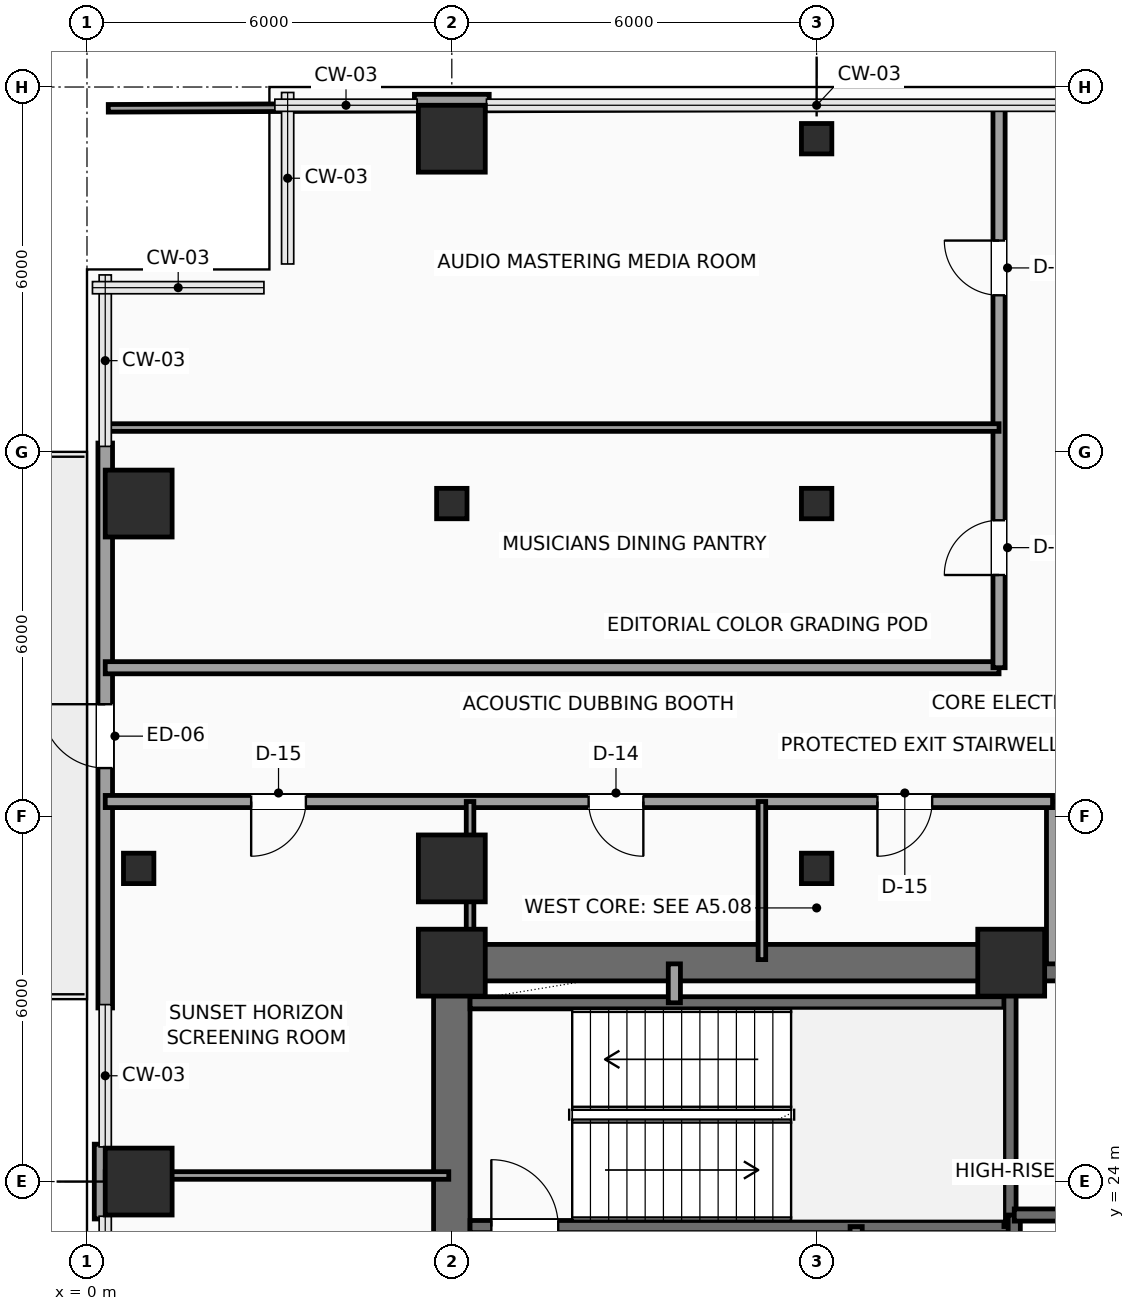
"""IFC4 building model, lengths in metres.
Left out: names, types, materials, properties, quantities, classifications, styles, units other than length and angle.
Written with IfcOpenShell. Run it as: python <this file> out.ifc"""

import sys

from ifc_helpers import new_model, si_unit, direction, frame, frame_2d, origin, origin_2d, place, context, subcontext, project, spatial, rectangle, hollow_rectangle, extrude, element, fill, save


model = new_model("IFC4")
c1 = context("Model", 3, precision=1e-05, world=origin(), true_north=direction((0.0, 1.0)))
c2 = subcontext(c1, "Body", "Model", "MODEL_VIEW")
j1 = project(units=[si_unit("LENGTHUNIT", "METRE"), si_unit("PLANEANGLEUNIT", "RADIAN")], contexts=[c1])
p1 = place(None, origin())
s1 = spatial("IfcSite", under=j1, at=p1, CompositionType="ELEMENT")
p2 = place(p1, origin())
s2 = spatial("IfcBuilding", under=s1, at=p2, CompositionType="ELEMENT")
p3 = place(p2, frame((0.0, 0.0, 153.15)))
s3 = spatial("IfcBuildingStorey", under=s2, at=p3, CompositionType="ELEMENT", Elevation=153.15)
for number, where, z_axis, x_axis in (
    (1, (6.0, 27.6, 0.0), (0.0, 0.0, 1.0), (1.0, 0.0, 0.0)),
    (2, (15.2, 27.6, 0.0), (0.0, 0.0, 1.0), (1.0, 0.0, 0.0)),
    (3, (0.85, 24.0, 0.0), (0.0, 0.0, 1.0), (1.0, 0.0, 0.0)),
):
    element("IfcColumn", number, at=place(p3, frame(where, z_axis=z_axis, x_axis=x_axis)), inside=s3, PredefinedType="COLUMN", context=c2, shape_type="SweptSolid", body=[
        extrude(rectangle(XDim=1.1, YDim=1.1, at=origin_2d()), origin(), (0.0, 0.0, 1.0), 3.75),
    ])
p4 = place(p3, frame((0.85, 29.15, 0.0), z_axis=(0.0, 0.0, 1.0), x_axis=(1.0, 0.0, 0.0)))
e4 = element("IfcColumn", 4, at=p4, inside=s3, PredefinedType="COLUMN", context=c2, shape_type="SweptSolid", body=[
    extrude(hollow_rectangle(XDim=0.5, YDim=0.5, WallThickness=0.025, InnerFilletRadius=0.025, OuterFilletRadius=0.04, at=origin_2d()), origin(), (0.0, 0.0, 1.0), 3.75),
])
for number, where, z_axis, x_axis in (
    (5, (0.85, 35.15, 0.0), (0.0, 0.0, 1.0), (1.0, 0.0, 0.0)),
    (6, (6.0, 29.15, 0.0), (0.0, 0.0, 1.0), (1.0, 0.0, 0.0)),
):
    element("IfcColumn", number, at=place(p3, frame(where, z_axis=z_axis, x_axis=x_axis)), inside=s3, PredefinedType="COLUMN", context=c2, shape_type="SweptSolid", body=[
        extrude(rectangle(XDim=1.1, YDim=1.1, at=origin_2d()), origin(), (0.0, 0.0, 1.0), 3.75),
    ])
p5 = place(p3, frame((6.0, 35.15, 0.0), z_axis=(0.0, 0.0, 1.0), x_axis=(1.0, 0.0, 0.0)))
e7 = element("IfcColumn", 7, at=p5, inside=s3, PredefinedType="COLUMN", context=c2, shape_type="SweptSolid", body=[
    extrude(hollow_rectangle(XDim=0.5, YDim=0.5, WallThickness=0.025, InnerFilletRadius=0.025, OuterFilletRadius=0.04, at=origin_2d()), origin(), (0.0, 0.0, 1.0), 3.75),
])
p6 = place(p3, frame((6.0, 41.15, 0.0), z_axis=(0.0, 0.0, 1.0), x_axis=(1.0, 0.0, 0.0)))
e8 = element("IfcColumn", 8, at=p6, inside=s3, PredefinedType="COLUMN", context=c2, shape_type="SweptSolid", body=[
    extrude(rectangle(XDim=1.1, YDim=1.1, at=origin_2d()), origin(), (0.0, 0.0, 1.0), 3.75),
])
for number, where, z_axis, x_axis in (
    (9, (12.0, 29.15, 0.0), (0.0, 0.0, 1.0), (1.0, 0.0, 0.0)),
    (10, (12.0, 35.15, 0.0), (0.0, 0.0, 1.0), (1.0, 0.0, 0.0)),
    (11, (12.0, 41.15, 0.0), (0.0, 0.0, 1.0), (1.0, 0.0, 0.0)),
):
    element("IfcColumn", number, at=place(p3, frame(where, z_axis=z_axis, x_axis=x_axis)), inside=s3, PredefinedType="COLUMN", context=c2, shape_type="SweptSolid", body=[
        extrude(hollow_rectangle(XDim=0.5, YDim=0.5, WallThickness=0.025, InnerFilletRadius=0.025, OuterFilletRadius=0.04, at=origin_2d()), origin(), (0.0, 0.0, 1.0), 3.75),
    ])
p7 = place(p3, frame((0.3, 26.855, 0.0), z_axis=(0.0, 0.0, 1.0), x_axis=(0.0, 1.0, 0.0)))
e12 = element("IfcWall", 12, at=p7, inside=s3, PredefinedType="SOLIDWALL", context=c2, shape_type="SweptSolid", body=[
    extrude(rectangle(XDim=9.29, YDim=0.24, at=frame_2d((4.645, 0.0))), origin(), (0.0, 0.0, 1.0), 3.525),
])
p8 = place(p7, frame((3.945, 0.0, 0.0)))
e13 = element("IfcOpeningElement", 13, at=p8, cuts=e12, PredefinedType="OPENING", context=c2, shape_type="SweptSolid", body=[
    extrude(rectangle(XDim=1.05, YDim=2.2, at=frame_2d((0.525, 1.1))), frame((0.0, 0.13, 0.0), z_axis=(0.0, -1.0, 0.0), x_axis=(1.0, 0.0, 0.0)), (0.0, 0.0, 1.0), 0.26),
])
for number, where, z_axis, x_axis in (
    (14, (0.24, 23.385, 0.0), (0.0, 0.0, 1.0), (0.0, 1.0, 0.0)),
    (15, (5.385, 41.76, 0.0), (0.0, 0.0, 1.0), (1.0, 0.0, 0.0)),
):
    element("IfcWall", number, at=place(p3, frame(where, z_axis=z_axis, x_axis=x_axis)), inside=s3, PredefinedType="SOLIDWALL", context=c2, shape_type="SweptSolid", body=[
        extrude(rectangle(XDim=1.23, YDim=0.24, at=frame_2d((0.615, 0.0))), origin(), (0.0, 0.0, 1.0), 3.525),
    ])
p9 = place(p3, frame((6.0, 27.6, 0.0), z_axis=(0.0, 0.0, 1.0), x_axis=(1.0, 0.0, 0.0)))
e16 = element("IfcWall", 16, at=p9, inside=s3, PredefinedType="SHEAR", context=c2, shape_type="SweptSolid", body=[
    extrude(rectangle(XDim=12.0, YDim=0.6, at=frame_2d((6.0, 0.0))), origin(), (0.0, 0.0, 1.0), 3.525),
])
p10 = place(p9, frame((10.2, 0.0, 0.0)))
e17 = element("IfcOpeningElement", 17, at=p10, cuts=e16, PredefinedType="OPENING", context=c2, shape_type="SweptSolid", body=[
    extrude(rectangle(XDim=0.9, YDim=2.15, at=frame_2d((0.45, 1.075))), frame((0.0, 0.31, 0.0), z_axis=(0.0, -1.0, 0.0), x_axis=(1.0, 0.0, 0.0)), (0.0, 0.0, 1.0), 0.62),
])
p11 = place(p3, frame((6.0, 18.0, 0.0), z_axis=(0.0, 0.0, 1.0), x_axis=(0.0, 1.0, 0.0)))
e18 = element("IfcWall", 18, at=p11, inside=s3, PredefinedType="SHEAR", context=c2, shape_type="SweptSolid", body=[
    extrude(rectangle(XDim=9.6, YDim=0.6, at=frame_2d((4.8, 0.0))), origin(), (0.0, 0.0, 1.0), 3.525),
])
p12 = place(p3, frame((6.3, 23.26, 0.0), z_axis=(0.0, 0.0, 1.0), x_axis=(1.0, 0.0, 0.0)))
e19 = element("IfcWall", 19, at=p12, inside=s3, PredefinedType="SHEAR", context=c2, shape_type="SweptSolid", body=[
    extrude(rectangle(XDim=8.88, YDim=0.2, at=frame_2d((4.44, 0.0))), origin(), (0.0, 0.0, 1.0), 3.525),
])
p13 = place(p12, frame((0.35, 0.0, 0.0)))
e20 = element("IfcOpeningElement", 20, at=p13, cuts=e19, PredefinedType="OPENING", context=c2, shape_type="SweptSolid", body=[
    extrude(rectangle(XDim=1.1, YDim=2.2, at=frame_2d((0.55, 1.1))), frame((0.0, 0.11, 0.0), z_axis=(0.0, -1.0, 0.0), x_axis=(1.0, 0.0, 0.0)), (0.0, 0.0, 1.0), 0.22),
])
p14 = place(p3, frame((6.3, 26.94, 0.0), z_axis=(0.0, 0.0, 1.0), x_axis=(1.0, 0.0, 0.0)))
e21 = element("IfcWall", 21, at=p14, inside=s3, PredefinedType="SHEAR", context=c2, shape_type="SweptSolid", body=[
    extrude(rectangle(XDim=8.88, YDim=0.2, at=frame_2d((4.44, 0.0))), origin(), (0.0, 0.0, 1.0), 3.525),
])
p15 = place(p3, frame((15.18, 23.26, 0.0), z_axis=(0.0, 0.0, 1.0), x_axis=(0.0, 1.0, 0.0)))
e22 = element("IfcWall", 22, at=p15, inside=s3, PredefinedType="SHEAR", context=c2, shape_type="SweptSolid", body=[
    extrude(rectangle(XDim=4.04, YDim=0.2, at=frame_2d((2.02, 0.0))), origin(), (0.0, 0.0, 1.0), 3.525),
])
p16 = place(p3, frame((12.65, 20.42, 0.0), z_axis=(0.0, 0.0, 1.0), x_axis=(0.0, 1.0, 0.0)))
e23 = element("IfcWall", 23, at=p16, inside=s3, PredefinedType="SHEAR", context=c2, shape_type="SweptSolid", body=[
    extrude(rectangle(XDim=2.84, YDim=0.2, at=frame_2d((1.42, 0.0))), origin(), (0.0, 0.0, 1.0), 3.525),
])
p17 = place(p16, frame((0.9, 0.0, 0.0)))
e24 = element("IfcOpeningElement", 24, at=p17, cuts=e23, PredefinedType="OPENING", context=c2, shape_type="SweptSolid", body=[
    extrude(rectangle(XDim=0.9, YDim=2.15, at=frame_2d((0.45, 1.075))), frame((0.0, 0.11, 0.0), z_axis=(0.0, -1.0, 0.0), x_axis=(1.0, 0.0, 0.0)), (0.0, 0.0, 1.0), 0.22),
])
p18 = place(p3, frame((9.66, 26.94, 0.0), z_axis=(0.0, 0.0, 1.0), x_axis=(0.0, 1.0, 0.0)))
e25 = element("IfcWall", 25, at=p18, inside=s3, PredefinedType="SOLIDWALL", context=c2, shape_type="SweptSolid", body=[
    extrude(rectangle(XDim=0.64, YDim=0.2, at=frame_2d((0.32, 0.0))), origin(), (0.0, 0.0, 1.0), 3.525),
])
p19 = place(p3, frame((15.25, 18.25, 0.0), z_axis=(0.0, 0.0, 1.0), x_axis=(0.0, 1.0, 0.0)))
e26 = element("IfcWall", 26, at=p19, inside=s3, PredefinedType="SHEAR", context=c2, shape_type="SweptSolid", body=[
    extrude(rectangle(XDim=5.2, YDim=0.2, at=frame_2d((2.6, 0.0))), origin(), (0.0, 0.0, 1.0), 3.525),
])
p20 = place(p3, frame((15.25, 23.45, 0.0), z_axis=(0.0, 0.0, 1.0), x_axis=(1.0, 0.0, 0.0)))
e27 = element("IfcWall", 27, at=p20, inside=s3, PredefinedType="SHEAR", context=c2, shape_type="SweptSolid", body=[
    extrude(rectangle(XDim=2.45, YDim=0.2, at=frame_2d((1.225, 0.0))), origin(), (0.0, 0.0, 1.0), 3.525),
])
p21 = place(p3, frame((15.88, 27.58, 0.0), z_axis=(0.0, 0.0, 1.0), x_axis=(0.0, 1.0, 0.0)))
e28 = element("IfcWall", 28, at=p21, inside=s3, PredefinedType="SOLIDWALL", context=c2, shape_type="SweptSolid", body=[
    extrude(rectangle(XDim=2.67, YDim=0.2, at=frame_2d((1.335, 0.0))), origin(), (0.0, 0.0, 1.0), 3.525),
])
p22 = place(p3, frame((15.88, 30.25, 0.0), z_axis=(0.0, 0.0, 1.0), x_axis=(-1.0, 0.0, 0.0)))
e29 = element("IfcWall", 29, at=p22, inside=s3, PredefinedType="SOLIDWALL", context=c2, shape_type="SweptSolid", body=[
    extrude(rectangle(XDim=15.58, YDim=0.2, at=frame_2d((7.79, 0.0))), origin(), (0.0, 0.0, 1.0), 3.525),
])
p23 = place(p22, frame((12.28, 0.0, 0.0)))
e30 = element("IfcOpeningElement", 30, at=p23, cuts=e29, PredefinedType="OPENING", context=c2, shape_type="SweptSolid", body=[
    extrude(rectangle(XDim=0.9, YDim=2.1, at=frame_2d((0.45, 1.05))), frame((0.0, 0.11, 0.0), z_axis=(0.0, -1.0, 0.0), x_axis=(1.0, 0.0, 0.0)), (0.0, 0.0, 1.0), 0.22),
])
p24 = place(p22, frame((6.73, 0.0, 0.0)))
e31 = element("IfcOpeningElement", 31, at=p24, cuts=e29, PredefinedType="OPENING", context=c2, shape_type="SweptSolid", body=[
    extrude(rectangle(XDim=0.9, YDim=2.1, at=frame_2d((0.45, 1.05))), frame((0.0, 0.11, 0.0), z_axis=(0.0, -1.0, 0.0), x_axis=(1.0, 0.0, 0.0)), (0.0, 0.0, 1.0), 0.22),
])
p25 = place(p22, frame((1.98, 0.0, 0.0)))
e32 = element("IfcOpeningElement", 32, at=p25, cuts=e29, PredefinedType="OPENING", context=c2, shape_type="SweptSolid", body=[
    extrude(rectangle(XDim=0.9, YDim=2.1, at=frame_2d((0.45, 1.05))), frame((0.0, 0.11, 0.0), z_axis=(0.0, -1.0, 0.0), x_axis=(1.0, 0.0, 0.0)), (0.0, 0.0, 1.0), 0.22),
])
p26 = place(p3, frame((0.3, 32.45, 0.0), z_axis=(0.0, 0.0, 1.0), x_axis=(1.0, 0.0, 0.0)))
e33 = element("IfcWall", 33, at=p26, inside=s3, PredefinedType="SOLIDWALL", context=c2, shape_type="SweptSolid", body=[
    extrude(rectangle(XDim=14.7, YDim=0.2, at=frame_2d((7.35, 0.0))), origin(), (0.0, 0.0, 1.0), 3.525),
])
p27 = place(p3, frame((15.0, 32.45, 0.0), z_axis=(0.0, 0.0, 1.0), x_axis=(0.0, 1.0, 0.0)))
e34 = element("IfcWall", 34, at=p27, inside=s3, PredefinedType="SOLIDWALL", context=c2, shape_type="SweptSolid", body=[
    extrude(rectangle(XDim=9.25, YDim=0.2, at=frame_2d((4.625, 0.0))), origin(), (0.0, 0.0, 1.0), 3.525),
])
p28 = place(p27, frame((1.525, 0.0, 0.0)))
e35 = element("IfcOpeningElement", 35, at=p28, cuts=e34, PredefinedType="OPENING", context=c2, shape_type="SweptSolid", body=[
    extrude(rectangle(XDim=0.9, YDim=2.1, at=frame_2d((0.45, 1.05))), frame((0.0, 0.11, 0.0), z_axis=(0.0, -1.0, 0.0), x_axis=(1.0, 0.0, 0.0)), (0.0, 0.0, 1.0), 0.22),
])
p29 = place(p27, frame((6.125, 0.0, 0.0)))
e36 = element("IfcOpeningElement", 36, at=p29, cuts=e34, PredefinedType="OPENING", context=c2, shape_type="SweptSolid", body=[
    extrude(rectangle(XDim=0.9, YDim=2.1, at=frame_2d((0.45, 1.05))), frame((0.0, 0.11, 0.0), z_axis=(0.0, -1.0, 0.0), x_axis=(1.0, 0.0, 0.0)), (0.0, 0.0, 1.0), 0.22),
])
p30 = place(p3, frame((0.3, 24.1, 0.0), z_axis=(0.0, 0.0, 1.0), x_axis=(1.0, 0.0, 0.0)))
e37 = element("IfcWall", 37, at=p30, inside=s3, PredefinedType="PARTITIONING", context=c2, shape_type="SweptSolid", body=[
    extrude(rectangle(XDim=5.65, YDim=0.125, at=frame_2d((2.825, 0.0))), origin(), (0.0, 0.0, 1.0), 3.525),
])
for number, where, z_axis, x_axis in (
    (38, (6.3, 27.65, 0.0), (0.0, 0.0, 1.0), (0.0, 1.0, 0.0)),
    (39, (11.1, 27.65, 0.0), (0.0, 0.0, 1.0), (0.0, 1.0, 0.0)),
):
    element("IfcWall", number, at=place(p3, frame(where, z_axis=z_axis, x_axis=x_axis)), inside=s3, PredefinedType="PARTITIONING", context=c2, shape_type="SweptSolid", body=[
        extrude(rectangle(XDim=2.6, YDim=0.125, at=frame_2d((1.3, 0.0))), origin(), (0.0, 0.0, 1.0), 3.525),
    ])
p31 = place(p3, frame((0.3, 36.4, 0.0), z_axis=(0.0, 0.0, 1.0), x_axis=(1.0, 0.0, 0.0)))
e40 = element("IfcWall", 40, at=p31, inside=s3, PredefinedType="PARTITIONING", context=c2, shape_type="SweptSolid", body=[
    extrude(rectangle(XDim=14.7, YDim=0.125, at=frame_2d((7.35, 0.0))), origin(), (0.0, 0.0, 1.0), 3.525),
])
p32 = place(p3, frame((0.35, 41.65, 0.0), z_axis=(0.0, 0.0, 1.0), x_axis=(0.999994073761, 0.003442737683, 0.0)))
e41 = element("IfcWall", 41, at=p32, inside=s3, PredefinedType="PARTITIONING", context=c2, shape_type="SweptSolid", body=[
    extrude(rectangle(XDim=5.035, YDim=0.125, at=frame_2d((2.518, 0.0))), origin(), (0.0, 0.0, 1.0), 3.525),
])
p33 = place(p3, frame((6.615, 41.671, 0.0), z_axis=(0.0, 0.0, 1.0), x_axis=(0.999994197557, 0.003406589638, 0.0)))
e42 = element("IfcWall", 42, at=p33, inside=s3, PredefinedType="PARTITIONING", context=c2, shape_type="SweptSolid", body=[
    extrude(rectangle(XDim=8.385, YDim=0.125, at=frame_2d((4.192, 0.0))), origin(), (0.0, 0.0, 1.0), 3.525),
])
p34 = place(p8, origin())
e43 = element("IfcDoor", 43, at=p34, inside=s3, OperationType="SINGLE_SWING_RIGHT", PredefinedType="DOOR", context=c2, shape_type="SweptSolid", body=[
    extrude(rectangle(XDim=1.05, YDim=2.2, at=frame_2d((0.525, 1.1))), frame((0.0, 0.025, 0.0), z_axis=(0.0, -1.0, 0.0), x_axis=(1.0, 0.0, 0.0)), (0.0, 0.0, 1.0), 0.05),
])
fill(e13, e43)
p35 = place(p13, origin())
e44 = element("IfcDoor", 44, at=p35, inside=s3, OperationType="SINGLE_SWING_LEFT", PredefinedType="DOOR", context=c2, shape_type="SweptSolid", body=[
    extrude(rectangle(XDim=1.1, YDim=2.2, at=frame_2d((0.55, 1.1))), frame((0.0, 0.025, 0.0), z_axis=(0.0, -1.0, 0.0), x_axis=(1.0, 0.0, 0.0)), (0.0, 0.0, 1.0), 0.05),
])
fill(e20, e44)
p36 = place(p23, origin())
e45 = element("IfcDoor", 45, at=p36, inside=s3, OperationType="SINGLE_SWING_RIGHT", PredefinedType="DOOR", context=c2, shape_type="SweptSolid", body=[
    extrude(rectangle(XDim=0.9, YDim=2.1, at=frame_2d((0.45, 1.05))), frame((0.0, 0.025, 0.0), z_axis=(0.0, -1.0, 0.0), x_axis=(1.0, 0.0, 0.0)), (0.0, 0.0, 1.0), 0.05),
])
fill(e30, e45)
p37 = place(p24, origin())
e46 = element("IfcDoor", 46, at=p37, inside=s3, OperationType="SINGLE_SWING_LEFT", PredefinedType="DOOR", context=c2, shape_type="SweptSolid", body=[
    extrude(rectangle(XDim=0.9, YDim=2.1, at=frame_2d((0.45, 1.05))), frame((0.0, 0.025, 0.0), z_axis=(0.0, -1.0, 0.0), x_axis=(1.0, 0.0, 0.0)), (0.0, 0.0, 1.0), 0.05),
])
fill(e31, e46)
p38 = place(p25, origin())
e47 = element("IfcDoor", 47, at=p38, inside=s3, OperationType="SINGLE_SWING_RIGHT", PredefinedType="DOOR", context=c2, shape_type="SweptSolid", body=[
    extrude(rectangle(XDim=0.9, YDim=2.1, at=frame_2d((0.45, 1.05))), frame((0.0, 0.025, 0.0), z_axis=(0.0, -1.0, 0.0), x_axis=(1.0, 0.0, 0.0)), (0.0, 0.0, 1.0), 0.05),
])
fill(e32, e47)
p39 = place(p28, origin())
e48 = element("IfcDoor", 48, at=p39, inside=s3, OperationType="SINGLE_SWING_LEFT", PredefinedType="DOOR", context=c2, shape_type="SweptSolid", body=[
    extrude(rectangle(XDim=0.9, YDim=2.1, at=frame_2d((0.45, 1.05))), frame((0.0, 0.025, 0.0), z_axis=(0.0, -1.0, 0.0), x_axis=(1.0, 0.0, 0.0)), (0.0, 0.0, 1.0), 0.05),
])
fill(e35, e48)
p40 = place(p29, origin())
e49 = element("IfcDoor", 49, at=p40, inside=s3, OperationType="SINGLE_SWING_RIGHT", PredefinedType="DOOR", context=c2, shape_type="SweptSolid", body=[
    extrude(rectangle(XDim=0.9, YDim=2.1, at=frame_2d((0.45, 1.05))), frame((0.0, 0.025, 0.0), z_axis=(0.0, -1.0, 0.0), x_axis=(1.0, 0.0, 0.0)), (0.0, 0.0, 1.0), 0.05),
])
fill(e36, e49)
save(model, sys.argv[1])
